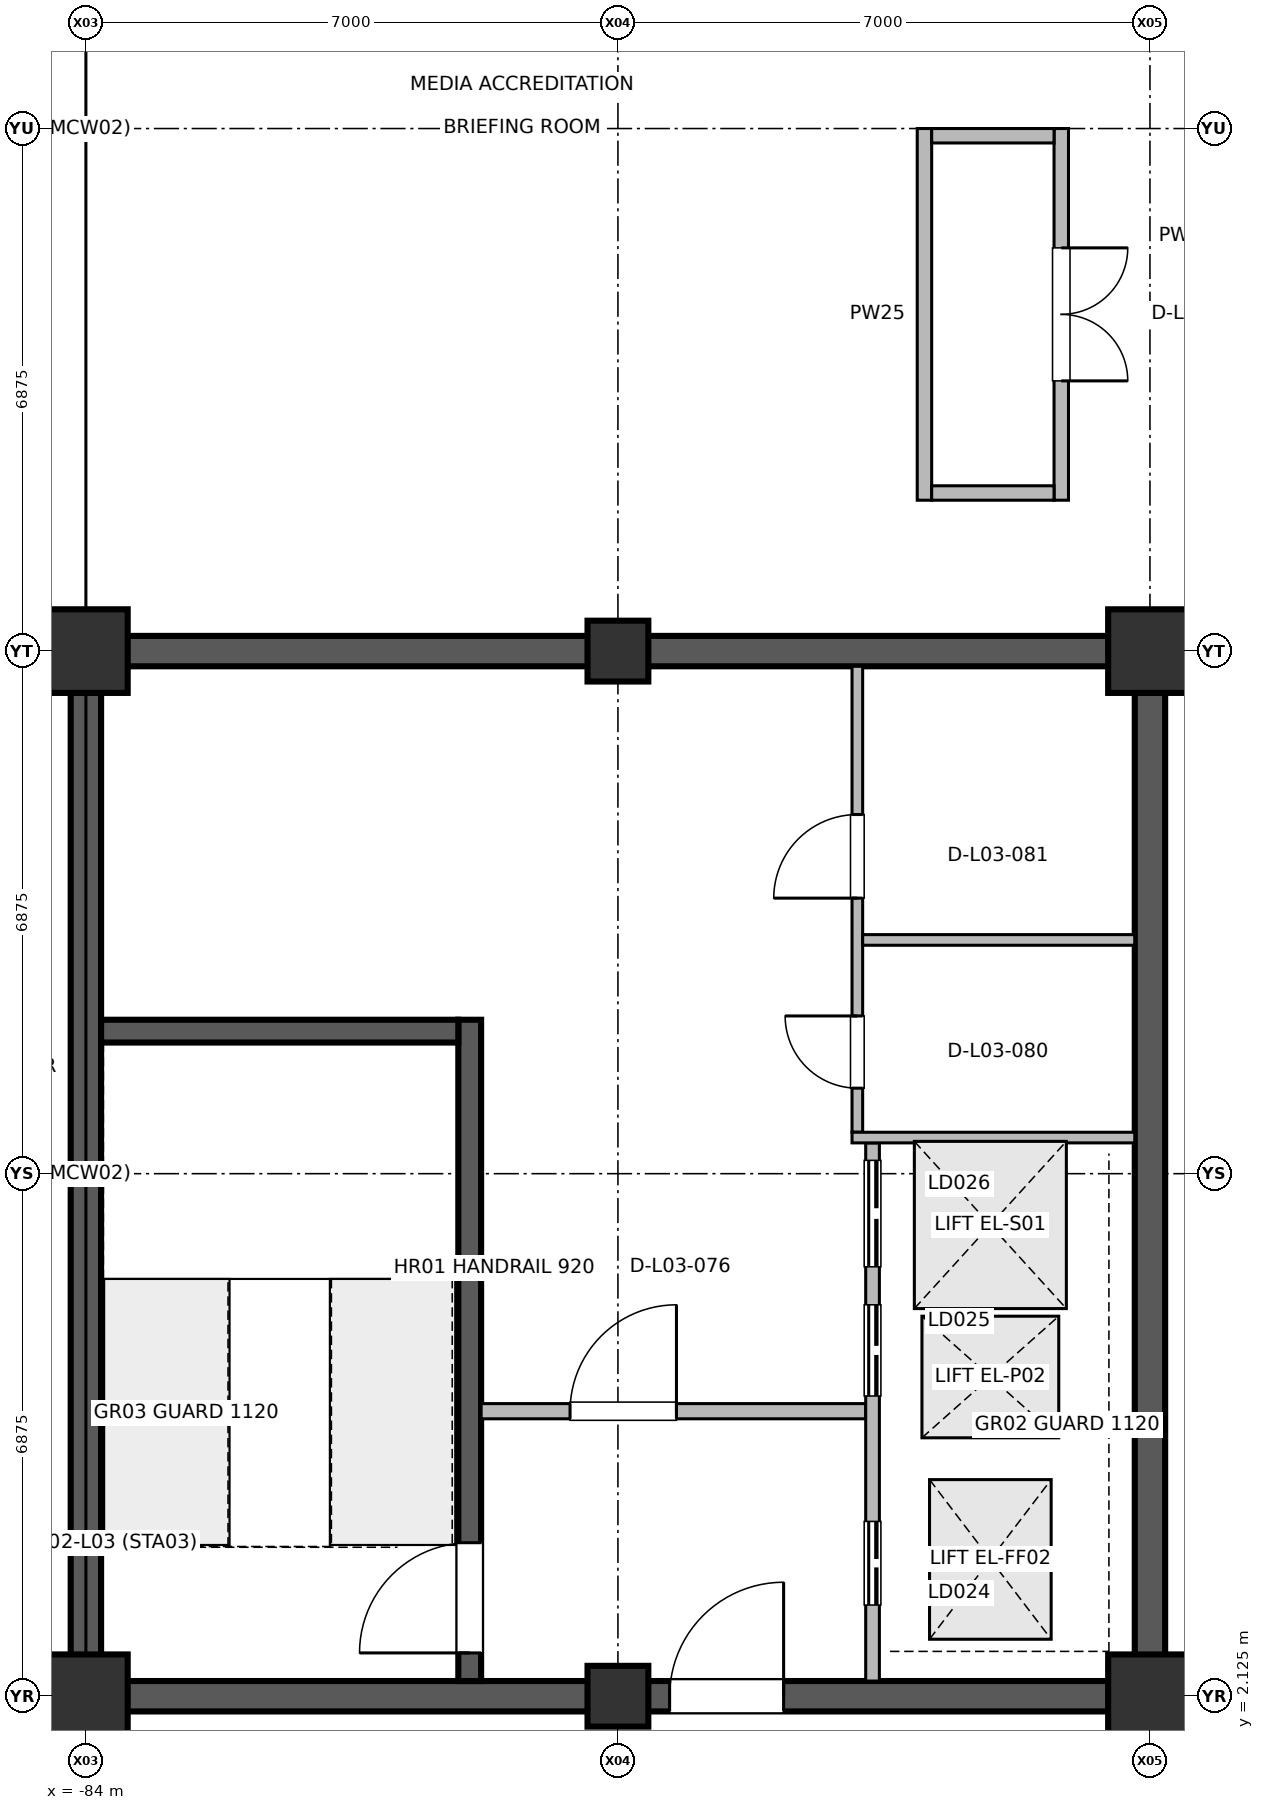
"""IFC4 building model, lengths in metres.
Left out: names, types, materials, properties, quantities, classifications, styles, units other than length and angle.
Written with IfcOpenShell. Run it as: python <this file> out.ifc"""

import sys

from ifc_helpers import new_model, si_unit, direction, frame, frame_2d, origin, origin_2d, place, context, subcontext, project, spatial, rectangle, extrude, element, fill, save


model = new_model("IFC4")
c1 = context("Model", 3, precision=1e-05, world=origin(), true_north=direction((0.0, 1.0)))
c2 = subcontext(c1, "Body", "Model", "MODEL_VIEW")
j1 = project(units=[si_unit("LENGTHUNIT", "METRE"), si_unit("PLANEANGLEUNIT", "RADIAN")], contexts=[c1])
p1 = place(None, origin())
s1 = spatial("IfcSite", under=j1, at=p1, CompositionType="ELEMENT")
p2 = place(p1, origin())
s2 = spatial("IfcBuilding", under=s1, at=p2, CompositionType="ELEMENT")
p3 = place(p2, frame((0.0, 0.0, 11.4)))
s3 = spatial("IfcBuildingStorey", under=s2, at=p3, CompositionType="ELEMENT", Elevation=11.4)
for number, where, z_axis, x_axis in (
    (1, (-84.0, 2.125, 0.0), (0.0, 0.0, 1.0), (1.0, 0.0, 0.0)),
    (2, (-84.0, 15.875, 0.0), (0.0, 0.0, 1.0), (1.0, 0.0, 0.0)),
):
    element("IfcColumn", number, at=place(p3, frame(where, z_axis=z_axis, x_axis=x_axis)), inside=s3, PredefinedType="COLUMN", context=c2, shape_type="SweptSolid", body=[
        extrude(rectangle(XDim=1.1, YDim=1.1, at=origin_2d()), origin(), (0.0, 0.0, 1.0), 4.798),
    ])
for number, where, z_axis, x_axis in (
    (3, (-77.0, 2.125, 0.0), (0.0, 0.0, 1.0), (1.0, 0.0, 0.0)),
    (4, (-77.0, 15.875, 0.0), (0.0, 0.0, 1.0), (1.0, 0.0, 0.0)),
):
    element("IfcColumn", number, at=place(p3, frame(where, z_axis=z_axis, x_axis=x_axis)), inside=s3, PredefinedType="COLUMN", context=c2, shape_type="SweptSolid", body=[
        extrude(rectangle(XDim=0.8, YDim=0.8, at=origin_2d()), origin(), (0.0, 0.0, 1.0), 4.798),
    ])
for number, where, z_axis, x_axis in (
    (5, (-70.0, 2.125, 0.0), (0.0, 0.0, 1.0), (1.0, 0.0, 0.0)),
    (6, (-70.0, 15.875, 0.0), (0.0, 0.0, 1.0), (1.0, 0.0, 0.0)),
):
    element("IfcColumn", number, at=place(p3, frame(where, z_axis=z_axis, x_axis=x_axis)), inside=s3, PredefinedType="COLUMN", context=c2, shape_type="SweptSolid", body=[
        extrude(rectangle(XDim=1.1, YDim=1.1, at=origin_2d()), origin(), (0.0, 0.0, 1.0), 4.798),
    ])
for number, where, z_axis, x_axis in (
    (7, (-84.0, 2.325, 0.0), (0.0, 0.0, 1.0), (0.0, 1.0, 0.0)),
    (8, (-70.0, 2.325, 0.0), (0.0, 0.0, 1.0), (0.0, 1.0, 0.0)),
):
    element("IfcWall", number, at=place(p3, frame(where, z_axis=z_axis, x_axis=x_axis)), inside=s3, PredefinedType="SHEAR", context=c2, shape_type="SweptSolid", body=[
        extrude(rectangle(XDim=13.35, YDim=0.4, at=frame_2d((6.675, 0.0))), origin(), (0.0, 0.0, 1.0), 4.58),
    ])
p4 = place(p3, frame((-83.8, 2.125, 0.0), z_axis=(0.0, 0.0, 1.0), x_axis=(1.0, 0.0, 0.0)))
e9 = element("IfcWall", 9, at=p4, inside=s3, PredefinedType="SHEAR", context=c2, shape_type="SweptSolid", body=[
    extrude(rectangle(XDim=13.6, YDim=0.4, at=frame_2d((6.8, 0.0))), origin(), (0.0, 0.0, 1.0), 4.58),
])
p5 = place(p4, frame((7.48, 0.0, 0.0)))
e10 = element("IfcOpeningElement", 10, at=p5, cuts=e9, PredefinedType="OPENING", context=c2, shape_type="SweptSolid", body=[
    extrude(rectangle(XDim=1.5, YDim=2.2, at=frame_2d((0.75, 1.1))), frame((0.0, 0.21, 0.0), z_axis=(0.0, -1.0, 0.0), x_axis=(1.0, 0.0, 0.0)), (0.0, 0.0, 1.0), 0.42),
])
p6 = place(p3, frame((-83.8, 15.875, 0.0), z_axis=(0.0, 0.0, 1.0), x_axis=(1.0, 0.0, 0.0)))
e11 = element("IfcWall", 11, at=p6, inside=s3, PredefinedType="SHEAR", context=c2, shape_type="SweptSolid", body=[
    extrude(rectangle(XDim=13.6, YDim=0.4, at=frame_2d((6.8, 0.0))), origin(), (0.0, 0.0, 1.0), 4.58),
])
p7 = place(p3, frame((-78.95, 2.325, 0.0), z_axis=(0.0, 0.0, 1.0), x_axis=(0.0, 1.0, 0.0)))
e12 = element("IfcWall", 12, at=p7, inside=s3, PredefinedType="SHEAR", context=c2, shape_type="SweptSolid", body=[
    extrude(rectangle(XDim=8.7, YDim=0.3, at=frame_2d((4.35, 0.0))), origin(), (0.0, 0.0, 1.0), 4.58),
])
p8 = place(p7, frame((0.37, 0.0, 0.0)))
e13 = element("IfcOpeningElement", 13, at=p8, cuts=e12, PredefinedType="OPENING", context=c2, shape_type="SweptSolid", body=[
    extrude(rectangle(XDim=1.45, YDim=2.2, at=frame_2d((0.725, 1.1))), frame((0.0, 0.16, 0.0), z_axis=(0.0, -1.0, 0.0), x_axis=(1.0, 0.0, 0.0)), (0.0, 0.0, 1.0), 0.32),
])
p9 = place(p3, frame((-78.8, 5.875, 0.0), z_axis=(0.0, 0.0, 1.0), x_axis=(1.0, 0.0, 0.0)))
e14 = element("IfcWall", 14, at=p9, inside=s3, PredefinedType="PARTITIONING", context=c2, shape_type="SweptSolid", body=[
    extrude(rectangle(XDim=5.06, YDim=0.2, at=frame_2d((2.53, 0.0))), origin(), (0.0, 0.0, 1.0), 3.705),
])
p10 = place(p9, frame((1.17, 0.0, 0.0)))
e15 = element("IfcOpeningElement", 15, at=p10, cuts=e14, PredefinedType="OPENING", context=c2, shape_type="SweptSolid", body=[
    extrude(rectangle(XDim=1.4, YDim=2.2, at=frame_2d((0.7, 1.1))), frame((0.0, 0.11, 0.0), z_axis=(0.0, -1.0, 0.0), x_axis=(1.0, 0.0, 0.0)), (0.0, 0.0, 1.0), 0.22),
])
p11 = place(p3, frame((-73.65, 2.325, 0.0), z_axis=(0.0, 0.0, 1.0), x_axis=(0.0, 1.0, 0.0)))
e16 = element("IfcWall", 16, at=p11, inside=s3, PredefinedType="PARTITIONING", context=c2, shape_type="SweptSolid", body=[
    extrude(rectangle(XDim=7.08, YDim=0.18, at=frame_2d((3.54, 0.0))), origin(), (0.0, 0.0, 1.0), 3.82),
])
p12 = place(p11, frame((1.0, 0.0, 0.0)))
e17 = element("IfcOpeningElement", 17, at=p12, cuts=e16, PredefinedType="OPENING", context=c2, shape_type="SweptSolid", body=[
    extrude(rectangle(XDim=1.1, YDim=2.2, at=frame_2d((0.55, 1.1))), frame((0.0, 0.1, 0.0), z_axis=(0.0, -1.0, 0.0), x_axis=(1.0, 0.0, 0.0)), (0.0, 0.0, 1.0), 0.2),
])
p13 = place(p11, frame((3.75, 0.0, 0.0)))
e18 = element("IfcOpeningElement", 18, at=p13, cuts=e16, PredefinedType="OPENING", context=c2, shape_type="SweptSolid", body=[
    extrude(rectangle(XDim=1.2, YDim=2.25, at=frame_2d((0.6, 1.125))), frame((0.0, 0.1, 0.0), z_axis=(0.0, -1.0, 0.0), x_axis=(1.0, 0.0, 0.0)), (0.0, 0.0, 1.0), 0.2),
])
p14 = place(p11, frame((5.45, 0.0, 0.0)))
e19 = element("IfcOpeningElement", 19, at=p14, cuts=e16, PredefinedType="OPENING", context=c2, shape_type="SweptSolid", body=[
    extrude(rectangle(XDim=1.4, YDim=2.3, at=frame_2d((0.7, 1.15))), frame((0.0, 0.1, 0.0), z_axis=(0.0, -1.0, 0.0), x_axis=(1.0, 0.0, 0.0)), (0.0, 0.0, 1.0), 0.2),
])
p15 = place(p3, frame((-73.85, 9.545, 0.0), z_axis=(0.0, 0.0, 1.0), x_axis=(0.0, 1.0, 0.0)))
e20 = element("IfcWall", 20, at=p15, inside=s3, PredefinedType="PARTITIONING", context=c2, shape_type="SweptSolid", body=[
    extrude(rectangle(XDim=6.13, YDim=0.14, at=frame_2d((3.065, 0.0))), origin(), (0.0, 0.0, 1.0), 3.82),
])
p16 = place(p15, frame((0.58, 0.0, 0.0)))
e21 = element("IfcOpeningElement", 21, at=p16, cuts=e20, PredefinedType="OPENING", context=c2, shape_type="SweptSolid", body=[
    extrude(rectangle(XDim=0.95, YDim=2.15, at=frame_2d((0.475, 1.075))), frame((0.0, 0.08, 0.0), z_axis=(0.0, -1.0, 0.0), x_axis=(1.0, 0.0, 0.0)), (0.0, 0.0, 1.0), 0.16),
])
p17 = place(p15, frame((3.08, 0.0, 0.0)))
e22 = element("IfcOpeningElement", 22, at=p17, cuts=e20, PredefinedType="OPENING", context=c2, shape_type="SweptSolid", body=[
    extrude(rectangle(XDim=1.1, YDim=2.15, at=frame_2d((0.55, 1.075))), frame((0.0, 0.08, 0.0), z_axis=(0.0, -1.0, 0.0), x_axis=(1.0, 0.0, 0.0)), (0.0, 0.0, 1.0), 0.16),
])
p18 = place(p3, frame((-71.167, 22.75, 0.0), z_axis=(0.0, 0.0, 1.0), x_axis=(0.0, -1.0, 0.0)))
e23 = element("IfcWall", 23, at=p18, inside=s3, PredefinedType="PARTITIONING", context=c2, shape_type="SweptSolid", body=[
    extrude(rectangle(XDim=4.89, YDim=0.19, at=frame_2d((2.445, 0.0))), origin(), (0.0, 0.0, 1.0), 3.82),
])
p19 = place(p18, frame((1.57, 0.0, 0.0)))
e24 = element("IfcOpeningElement", 24, at=p19, cuts=e23, PredefinedType="OPENING", context=c2, shape_type="SweptSolid", body=[
    extrude(rectangle(XDim=1.75, YDim=2.35, at=frame_2d((0.875, 1.175))), frame((0.0, 0.105, 0.0), z_axis=(0.0, -1.0, 0.0), x_axis=(1.0, 0.0, 0.0)), (0.0, 0.0, 1.0), 0.21),
])
p20 = place(p3, frame((-73.92, 9.475, 0.0), z_axis=(0.0, 0.0, 1.0), x_axis=(1.0, 0.0, 0.0)))
e25 = element("IfcWall", 25, at=p20, inside=s3, PredefinedType="PARTITIONING", context=c2, shape_type="SweptSolid", body=[
    extrude(rectangle(XDim=3.72, YDim=0.14, at=frame_2d((1.86, 0.0))), origin(), (0.0, 0.0, 1.0), 3.82),
])
p21 = place(p3, frame((-73.78, 12.075, 0.0), z_axis=(0.0, 0.0, 1.0), x_axis=(1.0, 0.0, 0.0)))
e26 = element("IfcWall", 26, at=p21, inside=s3, PredefinedType="PARTITIONING", context=c2, shape_type="SweptSolid", body=[
    extrude(rectangle(XDim=3.58, YDim=0.14, at=frame_2d((1.79, 0.0))), origin(), (0.0, 0.0, 1.0), 3.82),
])
p22 = place(p3, frame((-72.967, 17.86, 0.0), z_axis=(0.0, 0.0, 1.0), x_axis=(0.0, 1.0, 0.0)))
e27 = element("IfcWall", 27, at=p22, inside=s3, PredefinedType="PARTITIONING", context=c2, shape_type="SweptSolid", body=[
    extrude(rectangle(XDim=4.89, YDim=0.19, at=frame_2d((2.445, 0.0))), origin(), (0.0, 0.0, 1.0), 3.82),
])
for number, where, z_axis, x_axis in (
    (28, (-72.872, 17.955, 0.0), (0.0, 0.0, 1.0), (1.0, 0.0, 0.0)),
    (29, (-72.872, 22.655, 0.0), (0.0, 0.0, 1.0), (1.0, 0.0, 0.0)),
):
    element("IfcWall", number, at=place(p3, frame(where, z_axis=z_axis, x_axis=x_axis)), inside=s3, PredefinedType="PARTITIONING", context=c2, shape_type="SweptSolid", body=[
        extrude(rectangle(XDim=1.61, YDim=0.19, at=frame_2d((0.805, 0.0))), origin(), (0.0, 0.0, 1.0), 3.82),
    ])
p23 = place(p3, frame((-83.8, 10.875, 0.0), z_axis=(0.0, 0.0, 1.0), x_axis=(1.0, 0.0, 0.0)))
e30 = element("IfcWall", 30, at=p23, inside=s3, PredefinedType="SHEAR", context=c2, shape_type="SweptSolid", body=[
    extrude(rectangle(XDim=4.7, YDim=0.3, at=frame_2d((2.35, 0.0))), origin(), (0.0, 0.0, 1.0), 4.58),
])
p24 = place(p5, origin())
e31 = element("IfcDoor", 31, at=p24, inside=s3, OperationType="SINGLE_SWING_RIGHT", PredefinedType="DOOR", context=c2, shape_type="SweptSolid", body=[
    extrude(rectangle(XDim=1.5, YDim=2.2, at=frame_2d((0.75, 1.1))), frame((0.0, 0.025, 0.0), z_axis=(0.0, -1.0, 0.0), x_axis=(1.0, 0.0, 0.0)), (0.0, 0.0, 1.0), 0.05),
])
fill(e10, e31)
p25 = place(p8, origin())
e32 = element("IfcDoor", 32, at=p25, inside=s3, OperationType="SINGLE_SWING_LEFT", PredefinedType="DOOR", context=c2, shape_type="SweptSolid", body=[
    extrude(rectangle(XDim=1.45, YDim=2.2, at=frame_2d((0.725, 1.1))), frame((0.0, 0.025, 0.0), z_axis=(0.0, -1.0, 0.0), x_axis=(1.0, 0.0, 0.0)), (0.0, 0.0, 1.0), 0.05),
])
fill(e13, e32)
p26 = place(p10, origin())
e33 = element("IfcDoor", 33, at=p26, inside=s3, OperationType="SINGLE_SWING_RIGHT", PredefinedType="DOOR", context=c2, shape_type="SweptSolid", body=[
    extrude(rectangle(XDim=1.4, YDim=2.2, at=frame_2d((0.7, 1.1))), frame((0.0, 0.025, 0.0), z_axis=(0.0, -1.0, 0.0), x_axis=(1.0, 0.0, 0.0)), (0.0, 0.0, 1.0), 0.05),
])
fill(e15, e33)
p27 = place(p12, origin())
e34 = element("IfcDoor", 34, at=p27, inside=s3, OperationType="DOUBLE_DOOR_SLIDING", PredefinedType="DOOR", context=c2, shape_type="SweptSolid", body=[
    extrude(rectangle(XDim=1.1, YDim=2.2, at=frame_2d((0.55, 1.1))), frame((0.0, 0.025, 0.0), z_axis=(0.0, -1.0, 0.0), x_axis=(1.0, 0.0, 0.0)), (0.0, 0.0, 1.0), 0.05),
])
fill(e17, e34)
p28 = place(p13, origin())
e35 = element("IfcDoor", 35, at=p28, inside=s3, OperationType="DOUBLE_DOOR_SLIDING", PredefinedType="DOOR", context=c2, shape_type="SweptSolid", body=[
    extrude(rectangle(XDim=1.2, YDim=2.25, at=frame_2d((0.6, 1.125))), frame((0.0, 0.025, 0.0), z_axis=(0.0, -1.0, 0.0), x_axis=(1.0, 0.0, 0.0)), (0.0, 0.0, 1.0), 0.05),
])
fill(e18, e35)
p29 = place(p14, origin())
e36 = element("IfcDoor", 36, at=p29, inside=s3, OperationType="DOUBLE_DOOR_SLIDING", PredefinedType="DOOR", context=c2, shape_type="SweptSolid", body=[
    extrude(rectangle(XDim=1.4, YDim=2.3, at=frame_2d((0.7, 1.15))), frame((0.0, 0.025, 0.0), z_axis=(0.0, -1.0, 0.0), x_axis=(1.0, 0.0, 0.0)), (0.0, 0.0, 1.0), 0.05),
])
fill(e19, e36)
p30 = place(p16, origin())
e37 = element("IfcDoor", 37, at=p30, inside=s3, OperationType="SINGLE_SWING_RIGHT", PredefinedType="DOOR", context=c2, shape_type="SweptSolid", body=[
    extrude(rectangle(XDim=0.95, YDim=2.15, at=frame_2d((0.475, 1.075))), frame((0.0, 0.025, 0.0), z_axis=(0.0, -1.0, 0.0), x_axis=(1.0, 0.0, 0.0)), (0.0, 0.0, 1.0), 0.05),
])
fill(e21, e37)
p31 = place(p17, origin())
e38 = element("IfcDoor", 38, at=p31, inside=s3, OperationType="SINGLE_SWING_LEFT", PredefinedType="DOOR", context=c2, shape_type="SweptSolid", body=[
    extrude(rectangle(XDim=1.1, YDim=2.15, at=frame_2d((0.55, 1.075))), frame((0.0, 0.025, 0.0), z_axis=(0.0, -1.0, 0.0), x_axis=(1.0, 0.0, 0.0)), (0.0, 0.0, 1.0), 0.05),
])
fill(e22, e38)
p32 = place(p19, origin())
e39 = element("IfcDoor", 39, at=p32, inside=s3, OperationType="DOUBLE_DOOR_SINGLE_SWING", PredefinedType="DOOR", context=c2, shape_type="SweptSolid", body=[
    extrude(rectangle(XDim=1.75, YDim=2.35, at=frame_2d((0.875, 1.175))), frame((0.0, 0.025, 0.0), z_axis=(0.0, -1.0, 0.0), x_axis=(1.0, 0.0, 0.0)), (0.0, 0.0, 1.0), 0.05),
])
fill(e24, e39)
save(model, sys.argv[1])
